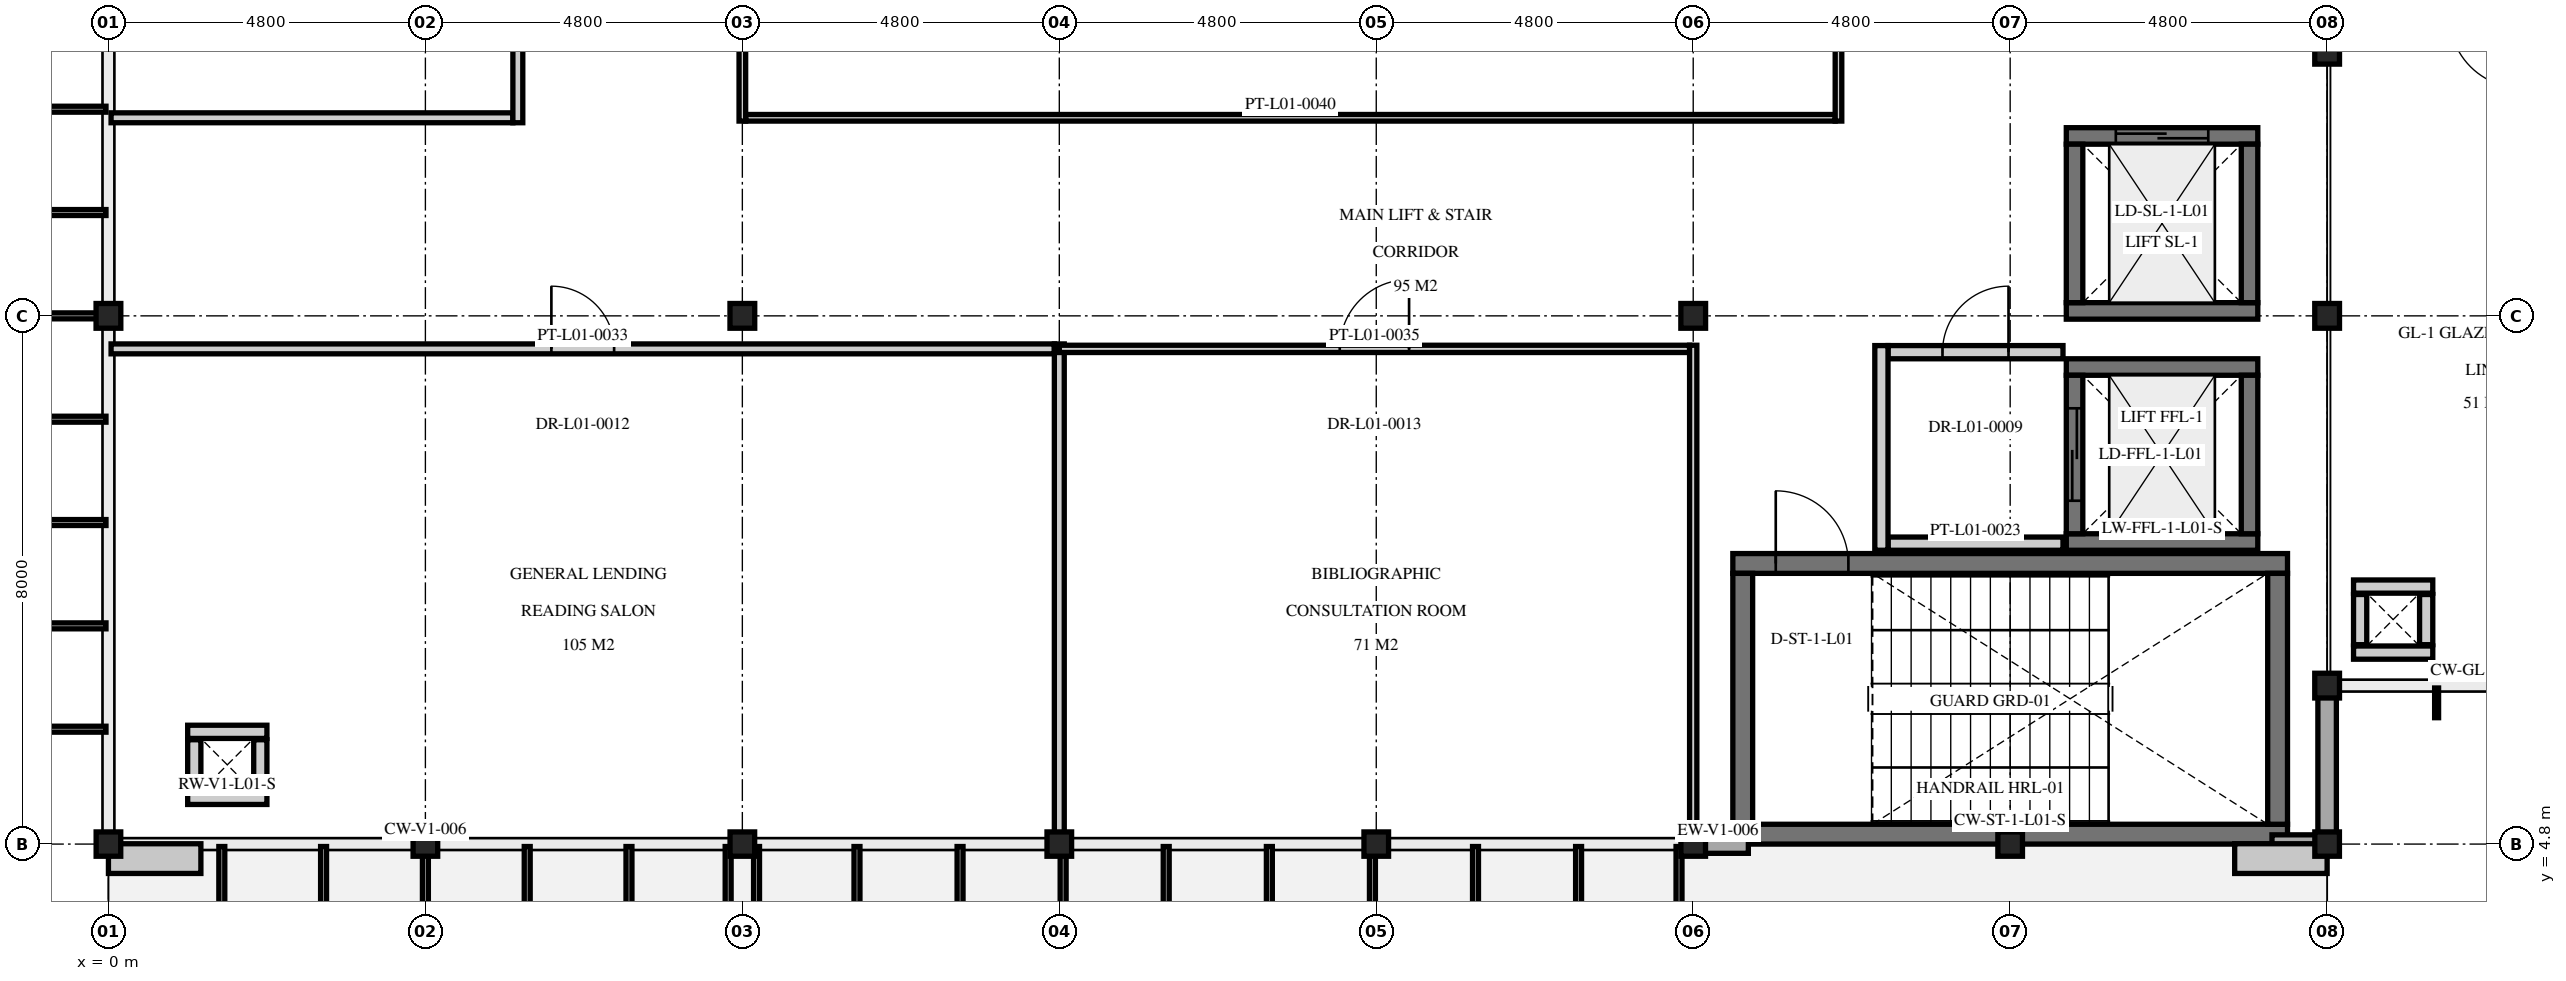
"""IFC4 building model, lengths in metres.
Left out: names, types, materials, properties, quantities, classifications, styles, units other than length and angle.
Written with IfcOpenShell. Run it as: python <this file> out.ifc"""

import sys

from ifc_helpers import new_model, si_unit, direction, frame, frame_2d, origin, origin_2d, place, context, subcontext, project, spatial, rectangle, i_section, extrude, element, fill, save


model = new_model("IFC4")
c1 = context("Model", 3, precision=1e-05, world=origin(), true_north=direction((0.0, 1.0)))
c2 = subcontext(c1, "Body", "Model", "MODEL_VIEW")
j1 = project(units=[si_unit("LENGTHUNIT", "METRE"), si_unit("PLANEANGLEUNIT", "RADIAN")], contexts=[c1])
p1 = place(None, origin())
s1 = spatial("IfcSite", under=j1, at=p1, CompositionType="ELEMENT")
p2 = place(p1, origin())
s2 = spatial("IfcBuilding", under=s1, at=p2, CompositionType="ELEMENT")
p3 = place(p2, frame((0.0, 0.0, 5.1)))
s3 = spatial("IfcBuildingStorey", under=s2, at=p3, CompositionType="ELEMENT", Elevation=5.1)
for number, where, z_axis, x_axis in (
    (1, (0.0, 4.8, 0.0), (0.0, 0.0, 1.0), (1.0, 0.0, 0.0)),
    (2, (4.8, 4.8, 0.0), (0.0, 0.0, 1.0), (1.0, 0.0, 0.0)),
    (3, (9.6, 4.8, 0.0), (0.0, 0.0, 1.0), (1.0, 0.0, 0.0)),
    (4, (14.4, 4.8, 0.0), (0.0, 0.0, 1.0), (1.0, 0.0, 0.0)),
    (5, (19.2, 4.8, 0.0), (0.0, 0.0, 1.0), (1.0, 0.0, 0.0)),
    (6, (24.0, 4.8, 0.0), (0.0, 0.0, 1.0), (1.0, 0.0, 0.0)),
    (7, (28.8, 4.8, 0.0), (0.0, 0.0, 1.0), (1.0, 0.0, 0.0)),
    (8, (33.6, 4.8, 0.0), (0.0, 0.0, 1.0), (1.0, 0.0, 0.0)),
):
    element("IfcColumn", number, at=place(p3, frame(where, z_axis=z_axis, x_axis=x_axis)), inside=s3, PredefinedType="COLUMN", context=c2, shape_type="SweptSolid", body=[
        extrude(i_section(OverallWidth=0.373, OverallDepth=0.368, WebThickness=0.014, FlangeThickness=0.024, at=origin_2d()), origin(), (0.0, 0.0, 1.0), 4.5),
    ])
for number, where, z_axis, x_axis in (
    (9, (0.0, 12.8, 0.0), (0.0, 0.0, 1.0), (1.0, 0.0, 0.0)),
    (10, (33.6, 7.2, 0.0), (0.0, 0.0, 1.0), (1.0, 0.0, 0.0)),
    (11, (33.6, 12.8, 0.0), (0.0, 0.0, 1.0), (1.0, 0.0, 0.0)),
    (12, (33.6, 16.8, 0.0), (0.0, 0.0, 1.0), (1.0, 0.0, 0.0)),
    (13, (9.6, 12.8, 0.0), (0.0, 0.0, 1.0), (1.0, 0.0, 0.0)),
    (14, (24.0, 12.8, 0.0), (0.0, 0.0, 1.0), (1.0, 0.0, 0.0)),
):
    element("IfcColumn", number, at=place(p3, frame(where, z_axis=z_axis, x_axis=x_axis)), inside=s3, PredefinedType="COLUMN", context=c2, shape_type="SweptSolid", body=[
        extrude(i_section(OverallWidth=0.375, OverallDepth=0.375, WebThickness=0.017, FlangeThickness=0.027, at=origin_2d()), origin(), (0.0, 0.0, 1.0), 4.5),
    ])
p4 = place(p3, frame((33.0, 4.95, 0.0), z_axis=(0.0, 0.0, 1.0), x_axis=(-1.0, 0.0, 0.0)))
e15 = element("IfcWall", 15, at=p4, inside=s3, PredefinedType="SHEAR", context=c2, shape_type="SweptSolid", body=[
    extrude(rectangle(XDim=8.4, YDim=0.3, at=frame_2d((4.2, 0.0))), origin(), (0.0, 0.0, 1.0), 4.29),
])
p5 = place(p3, frame((24.6, 9.05, 0.0), z_axis=(0.0, 0.0, 1.0), x_axis=(1.0, 0.0, 0.0)))
e16 = element("IfcWall", 16, at=p5, inside=s3, PredefinedType="SHEAR", context=c2, shape_type="SweptSolid", body=[
    extrude(rectangle(XDim=8.4, YDim=0.3, at=frame_2d((4.2, 0.0))), origin(), (0.0, 0.0, 1.0), 4.29),
])
p6 = place(p5, frame((0.65, 0.0, 0.0)))
e17 = element("IfcOpeningElement", 17, at=p6, cuts=e16, PredefinedType="OPENING", context=c2, shape_type="SweptSolid", body=[
    extrude(rectangle(XDim=1.1, YDim=2.2, at=frame_2d((0.55, 1.1))), frame((0.0, 0.16, 0.0), z_axis=(0.0, -1.0, 0.0), x_axis=(1.0, 0.0, 0.0)), (0.0, 0.0, 1.0), 0.32),
])
for number, where, z_axis, x_axis in (
    (18, (24.75, 5.1, 0.0), (0.0, 0.0, 1.0), (0.0, 1.0, 0.0)),
    (19, (32.85, 8.9, 0.0), (0.0, 0.0, 1.0), (0.0, -1.0, 0.0)),
):
    element("IfcWall", number, at=place(p3, frame(where, z_axis=z_axis, x_axis=x_axis)), inside=s3, PredefinedType="SHEAR", context=c2, shape_type="SweptSolid", body=[
        extrude(rectangle(XDim=3.8, YDim=0.3, at=frame_2d((1.9, 0.0))), origin(), (0.0, 0.0, 1.0), 4.29),
    ])
for number, where, z_axis, x_axis in (
    (20, (32.55, 9.375, 0.0), (0.0, 0.0, 1.0), (-1.0, 0.0, 0.0)),
    (21, (29.65, 12.025, 0.0), (0.0, 0.0, 1.0), (1.0, 0.0, 0.0)),
):
    element("IfcWall", number, at=place(p3, frame(where, z_axis=z_axis, x_axis=x_axis)), inside=s3, PredefinedType="SHEAR", context=c2, shape_type="SweptSolid", body=[
        extrude(rectangle(XDim=2.9, YDim=0.25, at=frame_2d((1.45, 0.0))), origin(), (0.0, 0.0, 1.0), 4.29),
    ])
p7 = place(p3, frame((29.775, 9.5, 0.0), z_axis=(0.0, 0.0, 1.0), x_axis=(0.0, 1.0, 0.0)))
e22 = element("IfcWall", 22, at=p7, inside=s3, PredefinedType="SHEAR", context=c2, shape_type="SweptSolid", body=[
    extrude(rectangle(XDim=2.4, YDim=0.25, at=frame_2d((1.2, 0.0))), origin(), (0.0, 0.0, 1.0), 4.29),
])
p8 = place(p7, frame((0.5, 0.0, 0.0)))
e23 = element("IfcOpeningElement", 23, at=p8, cuts=e22, PredefinedType="OPENING", context=c2, shape_type="SweptSolid", body=[
    extrude(rectangle(XDim=1.4, YDim=2.2, at=frame_2d((0.7, 1.1))), frame((0.0, 0.135, 0.0), z_axis=(0.0, -1.0, 0.0), x_axis=(1.0, 0.0, 0.0)), (0.0, 0.0, 1.0), 0.27),
])
p9 = place(p3, frame((32.425, 11.9, 0.0), z_axis=(0.0, 0.0, 1.0), x_axis=(0.0, -1.0, 0.0)))
e24 = element("IfcWall", 24, at=p9, inside=s3, PredefinedType="SHEAR", context=c2, shape_type="SweptSolid", body=[
    extrude(rectangle(XDim=2.4, YDim=0.25, at=frame_2d((1.2, 0.0))), origin(), (0.0, 0.0, 1.0), 4.29),
])
p10 = place(p3, frame((32.55, 12.875, 0.0), z_axis=(0.0, 0.0, 1.0), x_axis=(-1.0, 0.0, 0.0)))
e25 = element("IfcWall", 25, at=p10, inside=s3, PredefinedType="SHEAR", context=c2, shape_type="SweptSolid", body=[
    extrude(rectangle(XDim=2.9, YDim=0.25, at=frame_2d((1.45, 0.0))), origin(), (0.0, 0.0, 1.0), 4.29),
])
p11 = place(p3, frame((29.65, 15.525, 0.0), z_axis=(0.0, 0.0, 1.0), x_axis=(1.0, 0.0, 0.0)))
e26 = element("IfcWall", 26, at=p11, inside=s3, PredefinedType="SHEAR", context=c2, shape_type="SweptSolid", body=[
    extrude(rectangle(XDim=2.9, YDim=0.25, at=frame_2d((1.45, 0.0))), origin(), (0.0, 0.0, 1.0), 4.29),
])
p12 = place(p11, frame((0.75, 0.0, 0.0)))
e27 = element("IfcOpeningElement", 27, at=p12, cuts=e26, PredefinedType="OPENING", context=c2, shape_type="SweptSolid", body=[
    extrude(rectangle(XDim=1.4, YDim=2.2, at=frame_2d((0.7, 1.1))), frame((0.0, 0.135, 0.0), z_axis=(0.0, -1.0, 0.0), x_axis=(1.0, 0.0, 0.0)), (0.0, 0.0, 1.0), 0.27),
])
for number, where, z_axis, x_axis in (
    (28, (29.775, 13.0, 0.0), (0.0, 0.0, 1.0), (0.0, 1.0, 0.0)),
    (29, (32.425, 15.4, 0.0), (0.0, 0.0, 1.0), (0.0, -1.0, 0.0)),
):
    element("IfcWall", number, at=place(p3, frame(where, z_axis=z_axis, x_axis=x_axis)), inside=s3, PredefinedType="SHEAR", context=c2, shape_type="SweptSolid", body=[
        extrude(rectangle(XDim=2.4, YDim=0.25, at=frame_2d((1.2, 0.0))), origin(), (0.0, 0.0, 1.0), 4.29),
    ])
for number, where, z_axis, x_axis in (
    (30, (2.4, 5.5, 0.0), (0.0, 0.0, 1.0), (-1.0, 0.0, 0.0)),
    (31, (1.2, 6.5, 0.0), (0.0, 0.0, 1.0), (1.0, 0.0, 0.0)),
):
    element("IfcWall", number, at=place(p3, frame(where, z_axis=z_axis, x_axis=x_axis)), inside=s3, PredefinedType="PARTITIONING", context=c2, shape_type="SweptSolid", body=[
        extrude(rectangle(XDim=1.2, YDim=0.2, at=frame_2d((0.6, 0.0))), origin(), (0.0, 0.0, 1.0), 3.79),
    ])
for number, where, z_axis, x_axis in (
    (32, (1.3, 5.62, 0.0), (0.0, 0.0, 1.0), (0.0, 1.0, 0.0)),
    (33, (2.3, 6.38, 0.0), (0.0, 0.0, 1.0), (0.0, -1.0, 0.0)),
):
    element("IfcWall", number, at=place(p3, frame(where, z_axis=z_axis, x_axis=x_axis)), inside=s3, PredefinedType="PARTITIONING", context=c2, shape_type="SweptSolid", body=[
        extrude(rectangle(XDim=0.76, YDim=0.2, at=frame_2d((0.38, 0.0))), origin(), (0.0, 0.0, 1.0), 3.79),
    ])
for number, where, z_axis, x_axis in (
    (34, (35.2, 7.7, 0.0), (0.0, 0.0, 1.0), (-1.0, 0.0, 0.0)),
    (35, (34.0, 8.7, 0.0), (0.0, 0.0, 1.0), (1.0, 0.0, 0.0)),
):
    element("IfcWall", number, at=place(p3, frame(where, z_axis=z_axis, x_axis=x_axis)), inside=s3, PredefinedType="PARTITIONING", context=c2, shape_type="SweptSolid", body=[
        extrude(rectangle(XDim=1.2, YDim=0.2, at=frame_2d((0.6, 0.0))), origin(), (0.0, 0.0, 1.0), 3.79),
    ])
for number, where, z_axis, x_axis in (
    (36, (34.1, 7.82, 0.0), (0.0, 0.0, 1.0), (0.0, 1.0, 0.0)),
    (37, (35.1, 8.58, 0.0), (0.0, 0.0, 1.0), (0.0, -1.0, 0.0)),
):
    element("IfcWall", number, at=place(p3, frame(where, z_axis=z_axis, x_axis=x_axis)), inside=s3, PredefinedType="PARTITIONING", context=c2, shape_type="SweptSolid", body=[
        extrude(rectangle(XDim=0.76, YDim=0.2, at=frame_2d((0.38, 0.0))), origin(), (0.0, 0.0, 1.0), 3.79),
    ])
p13 = place(p3, frame((24.835, 4.8, 0.0), z_axis=(0.0, 0.0, 1.0), x_axis=(-1.0, 0.0, 0.0)))
e38 = element("IfcWall", 38, at=p13, inside=s3, PredefinedType="SOLIDWALL", context=c2, shape_type="SweptSolid", body=[
    extrude(rectangle(XDim=0.92, YDim=0.28, at=frame_2d((0.46, 0.0))), origin(), (0.0, 0.0, 1.0), 3.765),
])
p14 = place(p3, frame((33.685, 4.8, 0.0), z_axis=(0.0, 0.0, 1.0), x_axis=(-1.0, 0.0, 0.0)))
e39 = element("IfcWall", 39, at=p14, inside=s3, PredefinedType="SOLIDWALL", context=c2, shape_type="SweptSolid", body=[
    extrude(rectangle(XDim=0.92, YDim=0.28, at=frame_2d((0.46, 0.0))), origin(), (0.0, 0.0, 1.0), 3.765),
])
p15 = place(p3, frame((33.6, 7.285, 0.0), z_axis=(0.0, 0.0, 1.0), x_axis=(0.0, -1.0, 0.0)))
e40 = element("IfcWall", 40, at=p15, inside=s3, PredefinedType="SOLIDWALL", context=c2, shape_type="SweptSolid", body=[
    extrude(rectangle(XDim=2.57, YDim=0.28, at=frame_2d((1.285, 0.0))), origin(), (0.0, 0.0, 1.0), 3.765),
])
p16 = place(p3, frame((26.95, 9.35, 0.0), z_axis=(0.0, 0.0, 1.0), x_axis=(1.0, 0.0, 0.0)))
e41 = element("IfcWall", 41, at=p16, inside=s3, PredefinedType="PARTITIONING", context=c2, shape_type="SweptSolid", body=[
    extrude(rectangle(XDim=2.65, YDim=0.2, at=frame_2d((1.325, 0.0))), origin(), (0.0, 0.0, 1.0), 4.29),
])
p17 = place(p3, frame((26.95, 12.25, 0.0), z_axis=(0.0, 0.0, 1.0), x_axis=(1.0, 0.0, 0.0)))
e42 = element("IfcWall", 42, at=p17, inside=s3, PredefinedType="PARTITIONING", context=c2, shape_type="SweptSolid", body=[
    extrude(rectangle(XDim=2.65, YDim=0.2, at=frame_2d((1.325, 0.0))), origin(), (0.0, 0.0, 1.0), 4.29),
])
p18 = place(p17, frame((0.825, 0.0, 0.0)))
e43 = element("IfcOpeningElement", 43, at=p18, cuts=e42, PredefinedType="OPENING", context=c2, shape_type="SweptSolid", body=[
    extrude(rectangle(XDim=1.0, YDim=2.2, at=frame_2d((0.5, 1.1))), frame((0.0, 0.11, 0.0), z_axis=(0.0, -1.0, 0.0), x_axis=(1.0, 0.0, 0.0)), (0.0, 0.0, 1.0), 0.22),
])
p19 = place(p3, frame((26.85, 9.25, 0.0), z_axis=(0.0, 0.0, 1.0), x_axis=(0.0, 1.0, 0.0)))
e44 = element("IfcWall", 44, at=p19, inside=s3, PredefinedType="PARTITIONING", context=c2, shape_type="SweptSolid", body=[
    extrude(rectangle(XDim=3.1, YDim=0.2, at=frame_2d((1.55, 0.0))), origin(), (0.0, 0.0, 1.0), 4.29),
])
p20 = place(p3, frame((0.04, 12.3, 0.0), z_axis=(0.0, 0.0, 1.0), x_axis=(1.0, 0.0, 0.0)))
e45 = element("IfcWall", 45, at=p20, inside=s3, PredefinedType="PARTITIONING", context=c2, shape_type="SweptSolid", body=[
    extrude(rectangle(XDim=14.285, YDim=0.15, at=frame_2d((7.143, 0.0))), origin(), (0.0, 0.0, 1.0), 3.852),
])
p21 = place(p20, frame((6.668, 0.0, 0.0)))
e46 = element("IfcOpeningElement", 46, at=p21, cuts=e45, PredefinedType="OPENING", context=c2, shape_type="SweptSolid", body=[
    extrude(rectangle(XDim=0.95, YDim=2.15, at=frame_2d((0.475, 1.075))), frame((0.0, 0.085, 0.0), z_axis=(0.0, -1.0, 0.0), x_axis=(1.0, 0.0, 0.0)), (0.0, 0.0, 1.0), 0.17),
])
p22 = place(p3, frame((14.4, 4.84, 0.0), z_axis=(0.0, 0.0, 1.0), x_axis=(0.0, 1.0, 0.0)))
e47 = element("IfcWall", 47, at=p22, inside=s3, PredefinedType="PARTITIONING", context=c2, shape_type="SweptSolid", body=[
    extrude(rectangle(XDim=7.535, YDim=0.15, at=frame_2d((3.768, 0.0))), origin(), (0.0, 0.0, 1.0), 3.765),
])
p23 = place(p3, frame((14.4, 12.3, 0.0), z_axis=(0.0, 0.0, 1.0), x_axis=(1.0, 0.0, 0.0)))
e48 = element("IfcWall", 48, at=p23, inside=s3, PredefinedType="PARTITIONING", context=c2, shape_type="SweptSolid", body=[
    extrude(rectangle(XDim=9.545, YDim=0.11, at=frame_2d((4.772, 0.0))), origin(), (0.0, 0.0, 1.0), 3.852),
])
p24 = place(p23, frame((4.247, 0.0, 0.0)))
e49 = element("IfcOpeningElement", 49, at=p24, cuts=e48, PredefinedType="OPENING", context=c2, shape_type="SweptSolid", body=[
    extrude(rectangle(XDim=1.05, YDim=2.2, at=frame_2d((0.525, 1.1))), frame((0.0, 0.065, 0.0), z_axis=(0.0, -1.0, 0.0), x_axis=(1.0, 0.0, 0.0)), (0.0, 0.0, 1.0), 0.13),
])
p25 = place(p3, frame((24.0, 4.84, 0.0), z_axis=(0.0, 0.0, 1.0), x_axis=(0.0, 1.0, 0.0)))
e50 = element("IfcWall", 50, at=p25, inside=s3, PredefinedType="PARTITIONING", context=c2, shape_type="SweptSolid", body=[
    extrude(rectangle(XDim=7.515, YDim=0.11, at=frame_2d((3.757, 0.0))), origin(), (0.0, 0.0, 1.0), 3.765),
])
p26 = place(p3, frame((0.04, 15.8, 0.0), z_axis=(0.0, 0.0, 1.0), x_axis=(1.0, 0.0, 0.0)))
e51 = element("IfcWall", 51, at=p26, inside=s3, PredefinedType="PARTITIONING", context=c2, shape_type="SweptSolid", body=[
    extrude(rectangle(XDim=6.085, YDim=0.15, at=frame_2d((3.042, 0.0))), origin(), (0.0, 0.0, 1.0), 3.852),
])
p27 = place(p3, frame((6.2, 15.725, 0.0), z_axis=(0.0, 0.0, 1.0), x_axis=(0.0, 1.0, 0.0)))
e52 = element("IfcWall", 52, at=p27, inside=s3, PredefinedType="PARTITIONING", context=c2, shape_type="SweptSolid", body=[
    extrude(rectangle(XDim=14.45, YDim=0.15, at=frame_2d((7.225, 0.0))), origin(), (0.0, 0.0, 1.0), 3.765),
])
p28 = place(p27, frame((6.75, 0.0, 0.0)))
e53 = element("IfcOpeningElement", 53, at=p28, cuts=e52, PredefinedType="OPENING", context=c2, shape_type="SweptSolid", body=[
    extrude(rectangle(XDim=0.95, YDim=2.15, at=frame_2d((0.475, 1.075))), frame((0.0, 0.085, 0.0), z_axis=(0.0, -1.0, 0.0), x_axis=(1.0, 0.0, 0.0)), (0.0, 0.0, 1.0), 0.17),
])
p29 = place(p3, frame((9.65, 15.8, 0.0), z_axis=(0.0, 0.0, 1.0), x_axis=(1.0, 0.0, 0.0)))
e54 = element("IfcWall", 54, at=p29, inside=s3, PredefinedType="MOVABLE", context=c2, shape_type="SweptSolid", body=[
    extrude(rectangle(XDim=16.5, YDim=0.1, at=frame_2d((8.25, 0.0))), origin(), (0.0, 0.0, 1.0), 3.852),
])
p30 = place(p3, frame((9.6, 15.75, 0.0), z_axis=(0.0, 0.0, 1.0), x_axis=(0.0, 1.0, 0.0)))
e55 = element("IfcWall", 55, at=p30, inside=s3, PredefinedType="MOVABLE", context=c2, shape_type="SweptSolid", body=[
    extrude(rectangle(XDim=10.7, YDim=0.1, at=frame_2d((5.35, 0.0))), origin(), (0.0, 0.0, 1.0), 3.765),
])
p31 = place(p30, frame((6.375, 0.0, 0.0)))
e56 = element("IfcOpeningElement", 56, at=p31, cuts=e55, PredefinedType="OPENING", context=c2, shape_type="SweptSolid", body=[
    extrude(rectangle(XDim=0.95, YDim=2.15, at=frame_2d((0.475, 1.075))), frame((0.0, 0.06, 0.0), z_axis=(0.0, -1.0, 0.0), x_axis=(1.0, 0.0, 0.0)), (0.0, 0.0, 1.0), 0.12),
])
p32 = place(p3, frame((26.2, 15.75, 0.0), z_axis=(0.0, 0.0, 1.0), x_axis=(0.0, 1.0, 0.0)))
e57 = element("IfcWall", 57, at=p32, inside=s3, PredefinedType="MOVABLE", context=c2, shape_type="SweptSolid", body=[
    extrude(rectangle(XDim=10.7, YDim=0.1, at=frame_2d((5.35, 0.0))), origin(), (0.0, 0.0, 1.0), 3.765),
])
p33 = place(p6, origin())
e58 = element("IfcDoor", 58, at=p33, inside=s3, OperationType="SINGLE_SWING_LEFT", PredefinedType="DOOR", context=c2, shape_type="SweptSolid", body=[
    extrude(rectangle(XDim=1.1, YDim=2.2, at=frame_2d((0.55, 1.1))), frame((0.0, 0.025, 0.0), z_axis=(0.0, -1.0, 0.0), x_axis=(1.0, 0.0, 0.0)), (0.0, 0.0, 1.0), 0.05),
])
fill(e17, e58)
p34 = place(p8, origin())
e59 = element("IfcDoor", 59, at=p34, inside=s3, OperationType="DOUBLE_DOOR_SLIDING", PredefinedType="DOOR", context=c2, shape_type="SweptSolid", body=[
    extrude(rectangle(XDim=1.4, YDim=2.2, at=frame_2d((0.7, 1.1))), frame((0.0, 0.025, 0.0), z_axis=(0.0, -1.0, 0.0), x_axis=(1.0, 0.0, 0.0)), (0.0, 0.0, 1.0), 0.05),
])
fill(e23, e59)
p35 = place(p12, origin())
e60 = element("IfcDoor", 60, at=p35, inside=s3, OperationType="DOUBLE_DOOR_SLIDING", PredefinedType="DOOR", context=c2, shape_type="SweptSolid", body=[
    extrude(rectangle(XDim=1.4, YDim=2.2, at=frame_2d((0.7, 1.1))), frame((0.0, 0.025, 0.0), z_axis=(0.0, -1.0, 0.0), x_axis=(1.0, 0.0, 0.0)), (0.0, 0.0, 1.0), 0.05),
])
fill(e27, e60)
p36 = place(p18, origin())
e61 = element("IfcDoor", 61, at=p36, inside=s3, OperationType="SINGLE_SWING_RIGHT", PredefinedType="DOOR", context=c2, shape_type="SweptSolid", body=[
    extrude(rectangle(XDim=1.0, YDim=2.2, at=frame_2d((0.5, 1.1))), frame((0.0, 0.025, 0.0), z_axis=(0.0, -1.0, 0.0), x_axis=(1.0, 0.0, 0.0)), (0.0, 0.0, 1.0), 0.05),
])
fill(e43, e61)
p37 = place(p21, origin())
e62 = element("IfcDoor", 62, at=p37, inside=s3, OperationType="SINGLE_SWING_LEFT", PredefinedType="DOOR", context=c2, shape_type="SweptSolid", body=[
    extrude(rectangle(XDim=0.95, YDim=2.15, at=frame_2d((0.475, 1.075))), frame((0.0, 0.025, 0.0), z_axis=(0.0, -1.0, 0.0), x_axis=(1.0, 0.0, 0.0)), (0.0, 0.0, 1.0), 0.05),
])
fill(e46, e62)
p38 = place(p24, origin())
e63 = element("IfcDoor", 63, at=p38, inside=s3, OperationType="SINGLE_SWING_RIGHT", PredefinedType="DOOR", context=c2, shape_type="SweptSolid", body=[
    extrude(rectangle(XDim=1.05, YDim=2.2, at=frame_2d((0.525, 1.1))), frame((0.0, 0.025, 0.0), z_axis=(0.0, -1.0, 0.0), x_axis=(1.0, 0.0, 0.0)), (0.0, 0.0, 1.0), 0.05),
])
fill(e49, e63)
save(model, sys.argv[1])
